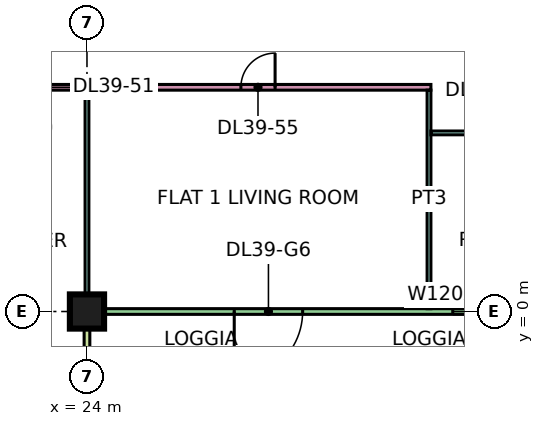
"""IFC4 building model, lengths in metres.
Left out: names, types, materials, properties, quantities, classifications, styles, units other than length and angle.
Written with IfcOpenShell. Run it as: python <this file> out.ifc"""

import sys

from ifc_helpers import new_model, si_unit, direction, frame, frame_2d, origin, origin_2d, place, context, subcontext, project, spatial, rectangle, extrude, element, fill, save


model = new_model("IFC4")
c1 = context("Model", 3, precision=1e-05, world=origin(), true_north=direction((0.0, 1.0)))
c2 = subcontext(c1, "Body", "Model", "MODEL_VIEW")
j1 = project(units=[si_unit("LENGTHUNIT", "METRE"), si_unit("PLANEANGLEUNIT", "RADIAN")], contexts=[c1])
p1 = place(None, origin())
s1 = spatial("IfcSite", under=j1, at=p1, CompositionType="ELEMENT")
p2 = place(p1, origin())
s2 = spatial("IfcBuilding", under=s1, at=p2, CompositionType="ELEMENT")
p3 = place(p2, frame((0.0, 0.0, 172.4)))
s3 = spatial("IfcBuildingStorey", under=s2, at=p3, CompositionType="ELEMENT", Elevation=172.4)
p4 = place(p3, frame((24.0, 0.0, 0.0), z_axis=(0.0, 0.0, 1.0), x_axis=(1.0, 0.0, 0.0)))
e1 = element("IfcColumn", 1, at=p4, inside=s3, PredefinedType="COLUMN", context=c2, shape_type="SweptSolid", body=[
    extrude(rectangle(XDim=0.9, YDim=0.9, at=origin_2d()), origin(), (0.0, 0.0, 1.0), 3.75),
])
p5 = place(p3, frame((24.075, 0.0, 0.0), z_axis=(0.0, 0.0, 1.0), x_axis=(1.0, 0.0, 0.0)))
e2 = element("IfcWall", 2, at=p5, inside=s3, PredefinedType="SOLIDWALL", context=c2, shape_type="SweptSolid", body=[
    extrude(rectangle(XDim=11.85, YDim=0.15, at=frame_2d((5.925, 0.0))), origin(), (0.0, 0.0, 1.0), 3.35),
])
p6 = place(p5, frame((3.8, 0.0, 0.0)))
e3 = element("IfcOpeningElement", 3, at=p6, cuts=e2, PredefinedType="OPENING", context=c2, shape_type="SweptSolid", body=[
    extrude(rectangle(XDim=1.8, YDim=2.4, at=frame_2d((0.9, 1.2))), frame((0.0, 0.085, 0.0), z_axis=(0.0, -1.0, 0.0), x_axis=(1.0, 0.0, 0.0)), (0.0, 0.0, 1.0), 0.17),
])
p7 = place(p5, frame((9.55, 0.0, 0.45)))
e4 = element("IfcOpeningElement", 4, at=p7, cuts=e2, PredefinedType="OPENING", context=c2, shape_type="SweptSolid", body=[
    extrude(rectangle(XDim=1.2, YDim=2.4, at=frame_2d((0.6, 1.2))), frame((0.0, 0.085, 0.0), z_axis=(0.0, -1.0, 0.0), x_axis=(1.0, 0.0, 0.0)), (0.0, 0.0, 1.0), 0.17),
])
p8 = place(p3, frame((24.0, -1.5, 0.0), z_axis=(0.0, 0.0, 1.0), x_axis=(0.0, 1.0, 0.0)))
e5 = element("IfcWall", 5, at=p8, inside=s3, PredefinedType="SOLIDWALL", context=c2, shape_type="SweptSolid", body=[
    extrude(rectangle(XDim=1.5, YDim=0.15, at=frame_2d((0.75, 0.0))), origin(), (0.0, 0.0, 1.0), 3.35),
])
p9 = place(p3, frame((11.95, 5.9, 0.0), z_axis=(0.0, 0.0, 1.0), x_axis=(1.0, 0.0, 0.0)))
e6 = element("IfcWall", 6, at=p9, inside=s3, PredefinedType="PARTITIONING", context=c2, shape_type="SweptSolid", body=[
    extrude(rectangle(XDim=21.1, YDim=0.15, at=frame_2d((10.55, 0.0))), origin(), (0.0, 0.0, 1.0), 3.35),
])
p10 = place(p9, frame((1.1, 0.0, 0.0)))
e7 = element("IfcOpeningElement", 7, at=p10, cuts=e6, PredefinedType="OPENING", context=c2, shape_type="SweptSolid", body=[
    extrude(rectangle(XDim=0.9, YDim=2.1, at=frame_2d((0.45, 1.05))), frame((0.0, 0.085, 0.0), z_axis=(0.0, -1.0, 0.0), x_axis=(1.0, 0.0, 0.0)), (0.0, 0.0, 1.0), 0.17),
])
p11 = place(p9, frame((4.1, 0.0, 0.0)))
e8 = element("IfcOpeningElement", 8, at=p11, cuts=e6, PredefinedType="OPENING", context=c2, shape_type="SweptSolid", body=[
    extrude(rectangle(XDim=0.9, YDim=2.1, at=frame_2d((0.45, 1.05))), frame((0.0, 0.085, 0.0), z_axis=(0.0, -1.0, 0.0), x_axis=(1.0, 0.0, 0.0)), (0.0, 0.0, 1.0), 0.17),
])
p12 = place(p9, frame((10.1, 0.0, 0.0)))
e9 = element("IfcOpeningElement", 9, at=p12, cuts=e6, PredefinedType="OPENING", context=c2, shape_type="SweptSolid", body=[
    extrude(rectangle(XDim=0.9, YDim=2.1, at=frame_2d((0.45, 1.05))), frame((0.0, 0.085, 0.0), z_axis=(0.0, -1.0, 0.0), x_axis=(1.0, 0.0, 0.0)), (0.0, 0.0, 1.0), 0.17),
])
p13 = place(p9, frame((16.1, 0.0, 0.0)))
e10 = element("IfcOpeningElement", 10, at=p13, cuts=e6, PredefinedType="OPENING", context=c2, shape_type="SweptSolid", body=[
    extrude(rectangle(XDim=0.9, YDim=2.1, at=frame_2d((0.45, 1.05))), frame((0.0, 0.085, 0.0), z_axis=(0.0, -1.0, 0.0), x_axis=(1.0, 0.0, 0.0)), (0.0, 0.0, 1.0), 0.17),
])
p14 = place(p3, frame((24.0, 0.0, 0.0), z_axis=(0.0, 0.0, 1.0), x_axis=(0.0, 1.0, 0.0)))
e11 = element("IfcWall", 11, at=p14, inside=s3, PredefinedType="PARTITIONING", context=c2, shape_type="SweptSolid", body=[
    extrude(rectangle(XDim=5.825, YDim=0.1, at=frame_2d((2.913, 0.0))), origin(), (0.0, 0.0, 1.0), 3.35),
])
p15 = place(p3, frame((33.0, 0.074, 0.0), z_axis=(0.0, 0.0, 1.0), x_axis=(0.0, 1.0, 0.0)))
e12 = element("IfcWall", 12, at=p15, inside=s3, PredefinedType="PARTITIONING", context=c2, shape_type="SweptSolid", body=[
    extrude(rectangle(XDim=5.751, YDim=0.1, at=frame_2d((2.875, 0.0))), origin(), (0.0, 0.0, 1.0), 3.35),
])
p16 = place(p3, frame((33.05, 4.7, 0.0), z_axis=(0.0, 0.0, 1.0), x_axis=(1.0, 0.0, 0.0)))
e13 = element("IfcWall", 13, at=p16, inside=s3, PredefinedType="PARTITIONING", context=c2, shape_type="SweptSolid", body=[
    extrude(rectangle(XDim=14.85, YDim=0.1, at=frame_2d((7.425, 0.0))), origin(), (0.0, 0.0, 1.0), 3.35),
])
p17 = place(p16, frame((1.0, 0.0, 0.0)))
e14 = element("IfcOpeningElement", 14, at=p17, cuts=e13, PredefinedType="OPENING", context=c2, shape_type="SweptSolid", body=[
    extrude(rectangle(XDim=0.9, YDim=2.1, at=frame_2d((0.45, 1.05))), frame((0.0, 0.06, 0.0), z_axis=(0.0, -1.0, 0.0), x_axis=(1.0, 0.0, 0.0)), (0.0, 0.0, 1.0), 0.12),
])
p18 = place(p16, frame((4.0, 0.0, 0.0)))
e15 = element("IfcOpeningElement", 15, at=p18, cuts=e13, PredefinedType="OPENING", context=c2, shape_type="SweptSolid", body=[
    extrude(rectangle(XDim=0.9, YDim=2.1, at=frame_2d((0.45, 1.05))), frame((0.0, 0.06, 0.0), z_axis=(0.0, -1.0, 0.0), x_axis=(1.0, 0.0, 0.0)), (0.0, 0.0, 1.0), 0.12),
])
p19 = place(p16, frame((10.0, 0.0, 0.0)))
e16 = element("IfcOpeningElement", 16, at=p19, cuts=e13, PredefinedType="OPENING", context=c2, shape_type="SweptSolid", body=[
    extrude(rectangle(XDim=0.9, YDim=2.1, at=frame_2d((0.45, 1.05))), frame((0.0, 0.06, 0.0), z_axis=(0.0, -1.0, 0.0), x_axis=(1.0, 0.0, 0.0)), (0.0, 0.0, 1.0), 0.12),
])
p20 = place(p6, frame((1.8, 0.0, 0.0), z_axis=(0.0, 0.0, 1.0), x_axis=(-1.0, 0.0, 0.0)))
e17 = element("IfcDoor", 17, at=p20, inside=s3, OperationType="DOUBLE_DOOR_SINGLE_SWING", PredefinedType="DOOR", context=c2, shape_type="SweptSolid", body=[
    extrude(rectangle(XDim=1.8, YDim=2.4, at=frame_2d((0.9, 1.2))), frame((0.0, 0.025, 0.0), z_axis=(0.0, -1.0, 0.0), x_axis=(1.0, 0.0, 0.0)), (0.0, 0.0, 1.0), 0.05),
])
fill(e3, e17)
p21 = place(p7, origin())
e18 = element("IfcWindow", 18, at=p21, inside=s3, PartitioningType="SINGLE_PANEL", PredefinedType="WINDOW", context=c2, shape_type="SweptSolid", body=[
    extrude(rectangle(XDim=1.2, YDim=2.4, at=frame_2d((0.6, 1.2))), frame((0.0, 0.03, 0.0), z_axis=(0.0, -1.0, 0.0), x_axis=(1.0, 0.0, 0.0)), (0.0, 0.0, 1.0), 0.06),
])
fill(e4, e18)
p22 = place(p13, frame((0.9, 0.0, 0.0), z_axis=(0.0, 0.0, 1.0), x_axis=(-1.0, 0.0, 0.0)))
e19 = element("IfcDoor", 19, at=p22, inside=s3, OperationType="SINGLE_SWING_RIGHT", PredefinedType="DOOR", context=c2, shape_type="SweptSolid", body=[
    extrude(rectangle(XDim=0.9, YDim=2.1, at=frame_2d((0.45, 1.05))), frame((0.0, 0.025, 0.0), z_axis=(0.0, -1.0, 0.0), x_axis=(1.0, 0.0, 0.0)), (0.0, 0.0, 1.0), 0.05),
])
fill(e10, e19)
save(model, sys.argv[1])
